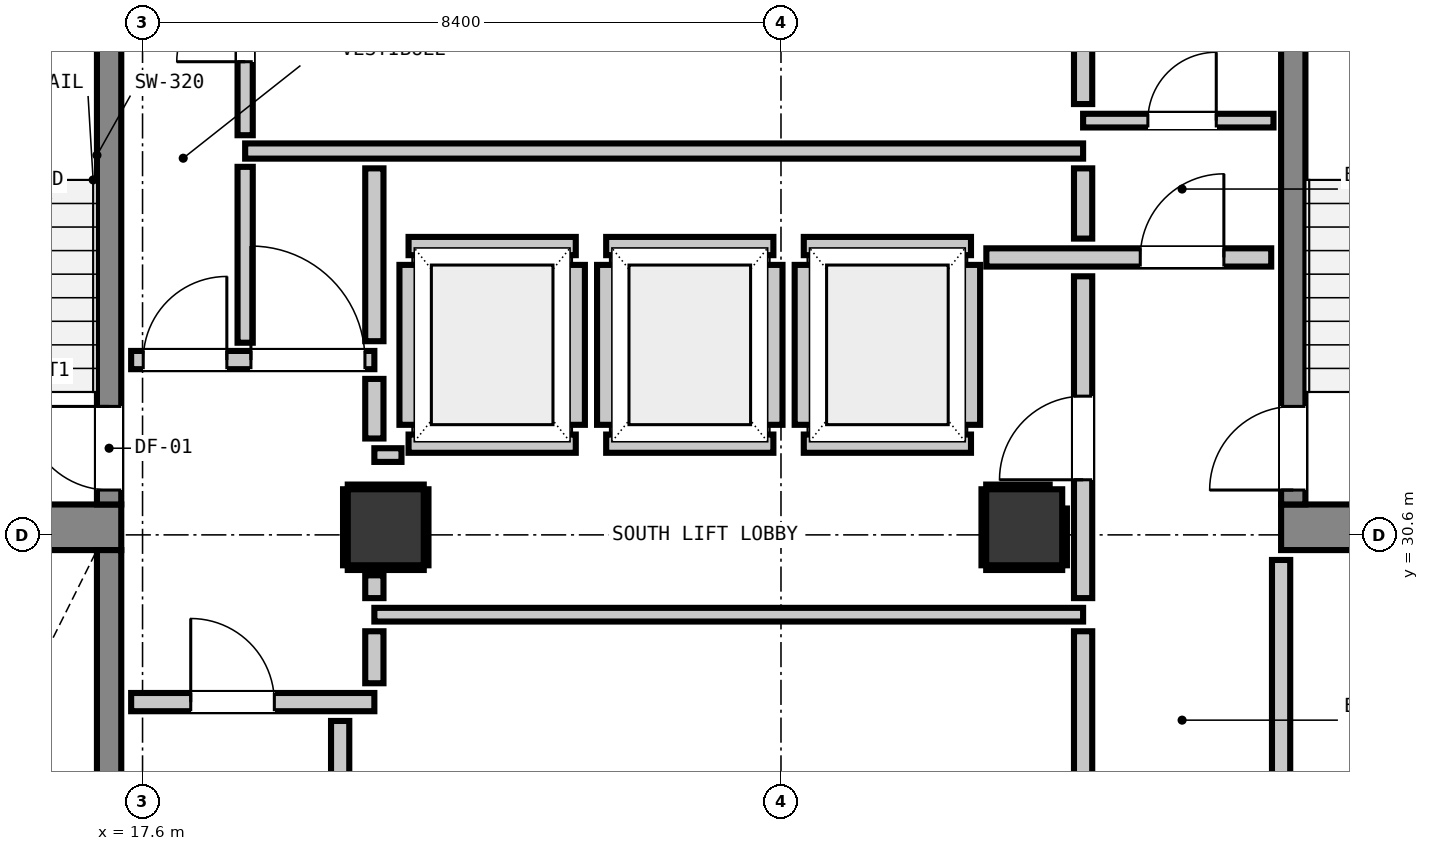
"""IFC4 building model, lengths in metres.
Left out: names, types, materials, properties, quantities, classifications, styles, units other than length and angle.
Written with IfcOpenShell. Run it as: python <this file> out.ifc"""

import sys

from ifc_helpers import new_model, si_unit, direction, frame, frame_2d, origin, origin_2d, place, context, subcontext, project, spatial, rectangle, extrude, element, fill, save


model = new_model("IFC4")
c1 = context("Model", 3, precision=1e-05, world=origin(), true_north=direction((0.0, 1.0)))
c2 = subcontext(c1, "Body", "Model", "MODEL_VIEW")
j1 = project(units=[si_unit("LENGTHUNIT", "METRE"), si_unit("PLANEANGLEUNIT", "RADIAN")], contexts=[c1])
p1 = place(None, origin())
s1 = spatial("IfcSite", under=j1, at=p1, CompositionType="ELEMENT")
p2 = place(p1, origin())
s2 = spatial("IfcBuilding", under=s1, at=p2, CompositionType="ELEMENT")
p3 = place(p2, frame((0.0, 0.0, 149.24)))
s3 = spatial("IfcBuildingStorey", under=s2, at=p3, CompositionType="ELEMENT", Elevation=149.24)
for number, where, z_axis, x_axis in (
    (1, (13.905, 30.7, 0.0), (0.0, 0.0, 1.0), (1.0, 0.0, 0.0)),
    (2, (32.58, 30.7, 0.0), (0.0, 0.0, 1.0), (1.0, 0.0, 0.0)),
):
    element("IfcWall", number, at=place(p3, frame(where, z_axis=z_axis, x_axis=x_axis)), inside=s3, PredefinedType="SHEAR", context=c2, shape_type="SweptSolid", body=[
        extrude(rectangle(XDim=3.415, YDim=0.6, at=frame_2d((1.708, 0.0))), origin(), (0.0, 0.0, 1.0), 3.32),
    ])
p4 = place(p3, frame((17.16, 31.0, 0.0), z_axis=(0.0, 0.0, 1.0), x_axis=(0.0, 1.0, 0.0)))
e3 = element("IfcWall", 3, at=p4, inside=s3, PredefinedType="SHEAR", context=c2, shape_type="SweptSolid", body=[
    extrude(rectangle(XDim=7.8, YDim=0.32, at=frame_2d((3.9, 0.0))), origin(), (0.0, 0.0, 1.0), 3.32),
])
p5 = place(p4, frame((0.19, 0.0, 0.0)))
e4 = element("IfcOpeningElement", 4, at=p5, cuts=e3, PredefinedType="OPENING", context=c2, shape_type="SweptSolid", body=[
    extrude(rectangle(XDim=1.1, YDim=2.15, at=frame_2d((0.55, 1.075))), frame((0.0, 0.17, 0.0), z_axis=(0.0, -1.0, 0.0), x_axis=(1.0, 0.0, 0.0)), (0.0, 0.0, 1.0), 0.34),
])
p6 = place(p3, frame((17.16, 22.5, 0.0), z_axis=(0.0, 0.0, 1.0), x_axis=(0.0, 1.0, 0.0)))
e5 = element("IfcWall", 5, at=p6, inside=s3, PredefinedType="SHEAR", context=c2, shape_type="SweptSolid", body=[
    extrude(rectangle(XDim=7.9, YDim=0.32, at=frame_2d((3.95, 0.0))), origin(), (0.0, 0.0, 1.0), 3.32),
])
p7 = place(p6, frame((0.29, 0.0, 0.0)))
e6 = element("IfcOpeningElement", 6, at=p7, cuts=e5, PredefinedType="OPENING", context=c2, shape_type="SweptSolid", body=[
    extrude(rectangle(XDim=1.1, YDim=2.15, at=frame_2d((0.55, 1.075))), frame((0.0, 0.17, 0.0), z_axis=(0.0, -1.0, 0.0), x_axis=(1.0, 0.0, 0.0)), (0.0, 0.0, 1.0), 0.34),
])
p8 = place(p3, frame((32.74, 31.0, 0.0), z_axis=(0.0, 0.0, 1.0), x_axis=(0.0, 1.0, 0.0)))
e7 = element("IfcWall", 7, at=p8, inside=s3, PredefinedType="SHEAR", context=c2, shape_type="SweptSolid", body=[
    extrude(rectangle(XDim=7.8, YDim=0.32, at=frame_2d((3.9, 0.0))), origin(), (0.0, 0.0, 1.0), 3.32),
])
p9 = place(p8, frame((0.19, 0.0, 0.0)))
e8 = element("IfcOpeningElement", 8, at=p9, cuts=e7, PredefinedType="OPENING", context=c2, shape_type="SweptSolid", body=[
    extrude(rectangle(XDim=1.1, YDim=2.15, at=frame_2d((0.55, 1.075))), frame((0.0, 0.17, 0.0), z_axis=(0.0, -1.0, 0.0), x_axis=(1.0, 0.0, 0.0)), (0.0, 0.0, 1.0), 0.34),
])
for number, where, z_axis, x_axis in (
    (9, (20.8, 30.7, 0.0), (0.0, 0.0, 1.0), (1.0, 0.0, 0.0)),
    (10, (29.2, 30.7, 0.0), (0.0, 0.0, 1.0), (1.0, 0.0, 0.0)),
):
    element("IfcColumn", number, at=place(p3, frame(where, z_axis=z_axis, x_axis=x_axis)), inside=s3, PredefinedType="COLUMN", context=c2, shape_type="SweptSolid", body=[
        extrude(rectangle(XDim=1.0, YDim=1.0, at=origin_2d()), origin(), (0.0, 0.0, 1.0), 3.32),
    ])
for number, where, z_axis, x_axis in (
    (11, (21.1, 31.8, 0.0), (0.0, 0.0, 1.0), (1.0, 0.0, 0.0)),
    (12, (21.1, 34.4, 0.0), (0.0, 0.0, 1.0), (1.0, 0.0, 0.0)),
):
    element("IfcWall", number, at=place(p3, frame(where, z_axis=z_axis, x_axis=x_axis)), inside=s3, PredefinedType="PARTITIONING", context=c2, shape_type="SweptSolid", body=[
        extrude(rectangle(XDim=2.2, YDim=0.24, at=frame_2d((1.1, 0.0))), origin(), (0.0, 0.0, 1.0), 3.08),
    ])
p10 = place(p3, frame((21.1, 32.048, 0.0), z_axis=(0.0, 0.0, 1.0), x_axis=(0.0, 1.0, 0.0)))
e13 = element("IfcWall", 13, at=p10, inside=s3, PredefinedType="PARTITIONING", context=c2, shape_type="SweptSolid", body=[
    extrude(rectangle(XDim=2.104, YDim=0.24, at=frame_2d((1.052, 0.0))), origin(), (0.0, 0.0, 1.0), 2.315),
])
p11 = place(p3, frame((23.3, 32.048, 0.0), z_axis=(0.0, 0.0, 1.0), x_axis=(0.0, 1.0, 0.0)))
e14 = element("IfcWall", 14, at=p11, inside=s3, PredefinedType="PARTITIONING", context=c2, shape_type="SweptSolid", body=[
    extrude(rectangle(XDim=2.104, YDim=0.24, at=frame_2d((1.052, 0.0))), origin(), (0.0, 0.0, 1.0), 3.08),
])
for number, where, z_axis, x_axis in (
    (15, (23.7, 31.8, 0.0), (0.0, 0.0, 1.0), (1.0, 0.0, 0.0)),
    (16, (23.7, 34.4, 0.0), (0.0, 0.0, 1.0), (1.0, 0.0, 0.0)),
):
    element("IfcWall", number, at=place(p3, frame(where, z_axis=z_axis, x_axis=x_axis)), inside=s3, PredefinedType="PARTITIONING", context=c2, shape_type="SweptSolid", body=[
        extrude(rectangle(XDim=2.2, YDim=0.24, at=frame_2d((1.1, 0.0))), origin(), (0.0, 0.0, 1.0), 3.08),
    ])
for number, where, z_axis, x_axis in (
    (17, (23.7, 32.048, 0.0), (0.0, 0.0, 1.0), (0.0, 1.0, 0.0)),
    (18, (25.9, 32.048, 0.0), (0.0, 0.0, 1.0), (0.0, 1.0, 0.0)),
):
    element("IfcWall", number, at=place(p3, frame(where, z_axis=z_axis, x_axis=x_axis)), inside=s3, PredefinedType="PARTITIONING", context=c2, shape_type="SweptSolid", body=[
        extrude(rectangle(XDim=2.104, YDim=0.24, at=frame_2d((1.052, 0.0))), origin(), (0.0, 0.0, 1.0), 3.08),
    ])
for number, where, z_axis, x_axis in (
    (19, (26.3, 31.8, 0.0), (0.0, 0.0, 1.0), (1.0, 0.0, 0.0)),
    (20, (26.3, 34.4, 0.0), (0.0, 0.0, 1.0), (1.0, 0.0, 0.0)),
):
    element("IfcWall", number, at=place(p3, frame(where, z_axis=z_axis, x_axis=x_axis)), inside=s3, PredefinedType="PARTITIONING", context=c2, shape_type="SweptSolid", body=[
        extrude(rectangle(XDim=2.2, YDim=0.24, at=frame_2d((1.1, 0.0))), origin(), (0.0, 0.0, 1.0), 3.08),
    ])
for number, where, z_axis, x_axis in (
    (21, (26.3, 32.048, 0.0), (0.0, 0.0, 1.0), (0.0, 1.0, 0.0)),
    (22, (28.5, 32.048, 0.0), (0.0, 0.0, 1.0), (0.0, 1.0, 0.0)),
):
    element("IfcWall", number, at=place(p3, frame(where, z_axis=z_axis, x_axis=x_axis)), inside=s3, PredefinedType="PARTITIONING", context=c2, shape_type="SweptSolid", body=[
        extrude(rectangle(XDim=2.104, YDim=0.24, at=frame_2d((1.052, 0.0))), origin(), (0.0, 0.0, 1.0), 3.08),
    ])
p12 = place(p3, frame((17.45, 28.4, 0.0), z_axis=(0.0, 0.0, 1.0), x_axis=(1.0, 0.0, 0.0)))
e23 = element("IfcWall", 23, at=p12, inside=s3, PredefinedType="PARTITIONING", context=c2, shape_type="SweptSolid", body=[
    extrude(rectangle(XDim=3.2, YDim=0.24, at=frame_2d((1.6, 0.0))), origin(), (0.0, 0.0, 1.0), 3.08),
])
p13 = place(p12, frame((0.784, 0.0, 0.0)))
e24 = element("IfcOpeningElement", 24, at=p13, cuts=e23, PredefinedType="OPENING", context=c2, shape_type="SweptSolid", body=[
    extrude(rectangle(XDim=1.1, YDim=2.15, at=frame_2d((0.55, 1.075))), frame((0.0, 0.13, 0.0), z_axis=(0.0, -1.0, 0.0), x_axis=(1.0, 0.0, 0.0)), (0.0, 0.0, 1.0), 0.26),
])
p14 = place(p3, frame((17.45, 32.9, 0.0), z_axis=(0.0, 0.0, 1.0), x_axis=(1.0, 0.0, 0.0)))
e25 = element("IfcWall", 25, at=p14, inside=s3, PredefinedType="PARTITIONING", context=c2, shape_type="SweptSolid", body=[
    extrude(rectangle(XDim=3.2, YDim=0.24, at=frame_2d((1.6, 0.0))), origin(), (0.0, 0.0, 1.0), 3.08),
])
p15 = place(p14, frame((0.159, 0.0, 0.0)))
e26 = element("IfcOpeningElement", 26, at=p15, cuts=e25, PredefinedType="OPENING", context=c2, shape_type="SweptSolid", body=[
    extrude(rectangle(XDim=1.1, YDim=2.15, at=frame_2d((0.55, 1.075))), frame((0.0, 0.13, 0.0), z_axis=(0.0, -1.0, 0.0), x_axis=(1.0, 0.0, 0.0)), (0.0, 0.0, 1.0), 0.26),
])
p16 = place(p14, frame((1.576, 0.0, 0.0)))
e27 = element("IfcOpeningElement", 27, at=p16, cuts=e25, PredefinedType="OPENING", context=c2, shape_type="SweptSolid", body=[
    extrude(rectangle(XDim=1.5, YDim=2.15, at=frame_2d((0.75, 1.075))), frame((0.0, 0.13, 0.0), z_axis=(0.0, -1.0, 0.0), x_axis=(1.0, 0.0, 0.0)), (0.0, 0.0, 1.0), 0.26),
])
p17 = place(p3, frame((28.702, 34.25, 0.0), z_axis=(0.0, 0.0, 1.0), x_axis=(1.0, 0.0, 0.0)))
e28 = element("IfcWall", 28, at=p17, inside=s3, PredefinedType="PARTITIONING", context=c2, shape_type="SweptSolid", body=[
    extrude(rectangle(XDim=3.748, YDim=0.24, at=frame_2d((1.874, 0.0))), origin(), (0.0, 0.0, 1.0), 3.08),
])
p18 = place(p17, frame((2.025, 0.0, 0.0)))
e29 = element("IfcOpeningElement", 29, at=p18, cuts=e28, PredefinedType="OPENING", context=c2, shape_type="SweptSolid", body=[
    extrude(rectangle(XDim=1.1, YDim=2.15, at=frame_2d((0.55, 1.075))), frame((0.0, 0.13, 0.0), z_axis=(0.0, -1.0, 0.0), x_axis=(1.0, 0.0, 0.0)), (0.0, 0.0, 1.0), 0.26),
])
p19 = place(p3, frame((18.95, 35.65, 0.0), z_axis=(0.0, 0.0, 1.0), x_axis=(1.0, 0.0, 0.0)))
e30 = element("IfcWall", 30, at=p19, inside=s3, PredefinedType="PARTITIONING", context=c2, shape_type="SweptSolid", body=[
    extrude(rectangle(XDim=11.025, YDim=0.2, at=frame_2d((5.513, 0.0))), origin(), (0.0, 0.0, 1.0), 3.08),
])
p20 = place(p3, frame((20.65, 29.55, 0.0), z_axis=(0.0, 0.0, 1.0), x_axis=(1.0, 0.0, 0.0)))
e31 = element("IfcWall", 31, at=p20, inside=s3, PredefinedType="PARTITIONING", context=c2, shape_type="SweptSolid", body=[
    extrude(rectangle(XDim=9.325, YDim=0.18, at=frame_2d((4.663, 0.0))), origin(), (0.0, 0.0, 1.0), 3.08),
])
p21 = place(p3, frame((20.65, 31.65, 0.0), z_axis=(0.0, 0.0, 1.0), x_axis=(1.0, 0.0, 0.0)))
e32 = element("IfcWall", 32, at=p21, inside=s3, PredefinedType="PARTITIONING", context=c2, shape_type="SweptSolid", body=[
    extrude(rectangle(XDim=0.357, YDim=0.18, at=frame_2d((0.179, 0.0))), origin(), (0.0, 0.0, 1.0), 3.08),
])
p22 = place(p3, frame((29.975, 36.05, 0.0), z_axis=(0.0, 0.0, 1.0), x_axis=(1.0, 0.0, 0.0)))
e33 = element("IfcWall", 33, at=p22, inside=s3, PredefinedType="PARTITIONING", context=c2, shape_type="SweptSolid", body=[
    extrude(rectangle(XDim=2.505, YDim=0.18, at=frame_2d((1.252, 0.0))), origin(), (0.0, 0.0, 1.0), 3.08),
])
p23 = place(p22, frame((0.852, 0.0, 0.0)))
e34 = element("IfcOpeningElement", 34, at=p23, cuts=e33, PredefinedType="OPENING", context=c2, shape_type="SweptSolid", body=[
    extrude(rectangle(XDim=0.9, YDim=2.1, at=frame_2d((0.45, 1.05))), frame((0.0, 0.1, 0.0), z_axis=(0.0, -1.0, 0.0), x_axis=(1.0, 0.0, 0.0)), (0.0, 0.0, 1.0), 0.2),
])
p24 = place(p3, frame((20.2, 22.586, 0.0), z_axis=(0.0, 0.0, 1.0), x_axis=(0.0, 1.0, 0.0)))
e35 = element("IfcWall", 35, at=p24, inside=s3, PredefinedType="PARTITIONING", context=c2, shape_type="SweptSolid", body=[
    extrude(rectangle(XDim=5.566, YDim=0.24, at=frame_2d((2.783, 0.0))), origin(), (0.0, 0.0, 1.0), 3.08),
])
p25 = place(p3, frame((20.65, 28.648, 0.0), z_axis=(0.0, 0.0, 1.0), x_axis=(0.0, 1.0, 0.0)))
e36 = element("IfcWall", 36, at=p25, inside=s3, PredefinedType="PARTITIONING", context=c2, shape_type="SweptSolid", body=[
    extrude(rectangle(XDim=0.684, YDim=0.24, at=frame_2d((0.342, 0.0))), origin(), (0.0, 0.0, 1.0), 2.315),
])
p26 = place(p3, frame((20.65, 29.768, 0.0), z_axis=(0.0, 0.0, 1.0), x_axis=(0.0, 1.0, 0.0)))
e37 = element("IfcWall", 37, at=p26, inside=s3, PredefinedType="PARTITIONING", context=c2, shape_type="SweptSolid", body=[
    extrude(rectangle(XDim=0.3, YDim=0.24, at=frame_2d((0.15, 0.0))), origin(), (0.0, 0.0, 1.0), 2.315),
])
p27 = place(p3, frame((20.65, 31.868, 0.0), z_axis=(0.0, 0.0, 1.0), x_axis=(0.0, 1.0, 0.0)))
e38 = element("IfcWall", 38, at=p27, inside=s3, PredefinedType="PARTITIONING", context=c2, shape_type="SweptSolid", body=[
    extrude(rectangle(XDim=0.784, YDim=0.24, at=frame_2d((0.392, 0.0))), origin(), (0.0, 0.0, 1.0), 2.315),
])
p28 = place(p3, frame((20.65, 33.148, 0.0), z_axis=(0.0, 0.0, 1.0), x_axis=(0.0, 1.0, 0.0)))
e39 = element("IfcWall", 39, at=p28, inside=s3, PredefinedType="PARTITIONING", context=c2, shape_type="SweptSolid", body=[
    extrude(rectangle(XDim=2.274, YDim=0.24, at=frame_2d((1.137, 0.0))), origin(), (0.0, 0.0, 1.0), 2.315),
])
p29 = place(p3, frame((29.975, 25.648, 0.0), z_axis=(0.0, 0.0, 1.0), x_axis=(0.0, 1.0, 0.0)))
e40 = element("IfcWall", 40, at=p29, inside=s3, PredefinedType="PARTITIONING", context=c2, shape_type="SweptSolid", body=[
    extrude(rectangle(XDim=3.684, YDim=0.24, at=frame_2d((1.842, 0.0))), origin(), (0.0, 0.0, 1.0), 3.08),
])
p30 = place(p3, frame((29.975, 29.768, 0.0), z_axis=(0.0, 0.0, 1.0), x_axis=(0.0, 1.0, 0.0)))
e41 = element("IfcWall", 41, at=p30, inside=s3, PredefinedType="PARTITIONING", context=c2, shape_type="SweptSolid", body=[
    extrude(rectangle(XDim=4.234, YDim=0.24, at=frame_2d((2.117, 0.0))), origin(), (0.0, 0.0, 1.0), 3.08),
])
p31 = place(p30, frame((1.557, 0.0, 0.0)))
e42 = element("IfcOpeningElement", 42, at=p31, cuts=e41, PredefinedType="OPENING", context=c2, shape_type="SweptSolid", body=[
    extrude(rectangle(XDim=1.1, YDim=2.15, at=frame_2d((0.55, 1.075))), frame((0.0, 0.13, 0.0), z_axis=(0.0, -1.0, 0.0), x_axis=(1.0, 0.0, 0.0)), (0.0, 0.0, 1.0), 0.26),
])
p32 = place(p3, frame((29.975, 34.498, 0.0), z_axis=(0.0, 0.0, 1.0), x_axis=(0.0, 1.0, 0.0)))
e43 = element("IfcWall", 43, at=p32, inside=s3, PredefinedType="PARTITIONING", context=c2, shape_type="SweptSolid", body=[
    extrude(rectangle(XDim=0.924, YDim=0.24, at=frame_2d((0.462, 0.0))), origin(), (0.0, 0.0, 1.0), 3.08),
])
p33 = place(p3, frame((29.975, 36.268, 0.0), z_axis=(0.0, 0.0, 1.0), x_axis=(0.0, 1.0, 0.0)))
e44 = element("IfcWall", 44, at=p33, inside=s3, PredefinedType="PARTITIONING", context=c2, shape_type="SweptSolid", body=[
    extrude(rectangle(XDim=2.294, YDim=0.24, at=frame_2d((1.147, 0.0))), origin(), (0.0, 0.0, 1.0), 3.08),
])
p34 = place(p3, frame((32.58, 25.648, 0.0), z_axis=(0.0, 0.0, 1.0), x_axis=(0.0, 1.0, 0.0)))
e45 = element("IfcWall", 45, at=p34, inside=s3, PredefinedType="PARTITIONING", context=c2, shape_type="SweptSolid", body=[
    extrude(rectangle(XDim=4.622, YDim=0.24, at=frame_2d((2.311, 0.0))), origin(), (0.0, 0.0, 1.0), 3.08),
])
p35 = place(p3, frame((18.95, 33.128, 0.0), z_axis=(0.0, 0.0, 1.0), x_axis=(0.0, 1.0, 0.0)))
e46 = element("IfcWall", 46, at=p35, inside=s3, PredefinedType="PARTITIONING", context=c2, shape_type="SweptSolid", body=[
    extrude(rectangle(XDim=2.314, YDim=0.2, at=frame_2d((1.157, 0.0))), origin(), (0.0, 0.0, 1.0), 3.08),
])
p36 = place(p3, frame((18.95, 35.858, 0.0), z_axis=(0.0, 0.0, 1.0), x_axis=(0.0, 1.0, 0.0)))
e47 = element("IfcWall", 47, at=p36, inside=s3, PredefinedType="PARTITIONING", context=c2, shape_type="SweptSolid", body=[
    extrude(rectangle(XDim=2.724, YDim=0.2, at=frame_2d((1.362, 0.0))), origin(), (0.0, 0.0, 1.0), 3.08),
])
p37 = place(p36, frame((0.967, 0.0, 0.0)))
e48 = element("IfcOpeningElement", 48, at=p37, cuts=e47, PredefinedType="OPENING", context=c2, shape_type="SweptSolid", body=[
    extrude(rectangle(XDim=0.9, YDim=2.1, at=frame_2d((0.45, 1.05))), frame((0.0, 0.11, 0.0), z_axis=(0.0, -1.0, 0.0), x_axis=(1.0, 0.0, 0.0)), (0.0, 0.0, 1.0), 0.22),
])
for number, where, z_axis, x_axis in (
    (49, (20.3, 30.168, 0.0), (0.0, 0.0, 1.0), (1.0, 0.0, 0.0)),
    (50, (20.3, 31.232, 0.0), (0.0, 0.0, 1.0), (1.0, 0.0, 0.0)),
    (51, (20.268, 30.2, 0.0), (0.0, 0.0, 1.0), (0.0, 1.0, 0.0)),
    (52, (21.332, 30.2, 0.0), (0.0, 0.0, 1.0), (0.0, 1.0, 0.0)),
    (53, (28.7, 30.168, 0.0), (0.0, 0.0, 1.0), (1.0, 0.0, 0.0)),
):
    element("IfcWall", number, at=place(p3, frame(where, z_axis=z_axis, x_axis=x_axis)), inside=s3, PredefinedType="PARTITIONING", context=c2, shape_type="SweptSolid", body=[
        extrude(rectangle(XDim=1.0, YDim=0.06, at=frame_2d((0.5, 0.0))), origin(), (0.0, 0.0, 1.0), 1.45),
    ])
p38 = place(p3, frame((28.7, 31.232, 0.0), z_axis=(0.0, 0.0, 1.0), x_axis=(1.0, 0.0, 0.0)))
e54 = element("IfcWall", 54, at=p38, inside=s3, PredefinedType="PARTITIONING", context=c2, shape_type="SweptSolid", body=[
    extrude(rectangle(XDim=0.835, YDim=0.06, at=frame_2d((0.417, 0.0))), origin(), (0.0, 0.0, 1.0), 1.45),
])
p39 = place(p3, frame((28.668, 30.2, 0.0), z_axis=(0.0, 0.0, 1.0), x_axis=(0.0, 1.0, 0.0)))
e55 = element("IfcWall", 55, at=p39, inside=s3, PredefinedType="PARTITIONING", context=c2, shape_type="SweptSolid", body=[
    extrude(rectangle(XDim=1.0, YDim=0.06, at=frame_2d((0.5, 0.0))), origin(), (0.0, 0.0, 1.0), 1.45),
])
p40 = place(p3, frame((29.732, 30.2, 0.0), z_axis=(0.0, 0.0, 1.0), x_axis=(0.0, 1.0, 0.0)))
e56 = element("IfcWall", 56, at=p40, inside=s3, PredefinedType="PARTITIONING", context=c2, shape_type="SweptSolid", body=[
    extrude(rectangle(XDim=0.747, YDim=0.06, at=frame_2d((0.374, 0.0))), origin(), (0.0, 0.0, 1.0), 1.45),
])
p41 = place(p5, origin())
e57 = element("IfcDoor", 57, at=p41, inside=s3, OperationType="SINGLE_SWING_RIGHT", PredefinedType="DOOR", context=c2, shape_type="SweptSolid", body=[
    extrude(rectangle(XDim=1.1, YDim=2.15, at=frame_2d((0.55, 1.075))), frame((0.0, 0.025, 0.0), z_axis=(0.0, -1.0, 0.0), x_axis=(1.0, 0.0, 0.0)), (0.0, 0.0, 1.0), 0.05),
])
fill(e4, e57)
p42 = place(p9, origin())
e58 = element("IfcDoor", 58, at=p42, inside=s3, OperationType="SINGLE_SWING_LEFT", PredefinedType="DOOR", context=c2, shape_type="SweptSolid", body=[
    extrude(rectangle(XDim=1.1, YDim=2.15, at=frame_2d((0.55, 1.075))), frame((0.0, 0.025, 0.0), z_axis=(0.0, -1.0, 0.0), x_axis=(1.0, 0.0, 0.0)), (0.0, 0.0, 1.0), 0.05),
])
fill(e8, e58)
p43 = place(p13, origin())
e59 = element("IfcDoor", 59, at=p43, inside=s3, OperationType="SINGLE_SWING_LEFT", PredefinedType="DOOR", context=c2, shape_type="SweptSolid", body=[
    extrude(rectangle(XDim=1.1, YDim=2.15, at=frame_2d((0.55, 1.075))), frame((0.0, 0.025, 0.0), z_axis=(0.0, -1.0, 0.0), x_axis=(1.0, 0.0, 0.0)), (0.0, 0.0, 1.0), 0.05),
])
fill(e24, e59)
p44 = place(p15, origin())
e60 = element("IfcDoor", 60, at=p44, inside=s3, OperationType="SINGLE_SWING_RIGHT", PredefinedType="DOOR", context=c2, shape_type="SweptSolid", body=[
    extrude(rectangle(XDim=1.1, YDim=2.15, at=frame_2d((0.55, 1.075))), frame((0.0, 0.025, 0.0), z_axis=(0.0, -1.0, 0.0), x_axis=(1.0, 0.0, 0.0)), (0.0, 0.0, 1.0), 0.05),
])
fill(e26, e60)
p45 = place(p31, origin())
e61 = element("IfcDoor", 61, at=p45, inside=s3, OperationType="SINGLE_SWING_LEFT", PredefinedType="DOOR", context=c2, shape_type="SweptSolid", body=[
    extrude(rectangle(XDim=1.1, YDim=2.15, at=frame_2d((0.55, 1.075))), frame((0.0, 0.025, 0.0), z_axis=(0.0, -1.0, 0.0), x_axis=(1.0, 0.0, 0.0)), (0.0, 0.0, 1.0), 0.05),
])
fill(e42, e61)
p46 = place(p18, origin())
e62 = element("IfcDoor", 62, at=p46, inside=s3, OperationType="SINGLE_SWING_RIGHT", PredefinedType="DOOR", context=c2, shape_type="SweptSolid", body=[
    extrude(rectangle(XDim=1.1, YDim=2.15, at=frame_2d((0.55, 1.075))), frame((0.0, 0.025, 0.0), z_axis=(0.0, -1.0, 0.0), x_axis=(1.0, 0.0, 0.0)), (0.0, 0.0, 1.0), 0.05),
])
fill(e29, e62)
p47 = place(p16, origin())
e63 = element("IfcDoor", 63, at=p47, inside=s3, OperationType="SINGLE_SWING_LEFT", PredefinedType="DOOR", context=c2, shape_type="SweptSolid", body=[
    extrude(rectangle(XDim=1.5, YDim=2.15, at=frame_2d((0.75, 1.075))), frame((0.0, 0.025, 0.0), z_axis=(0.0, -1.0, 0.0), x_axis=(1.0, 0.0, 0.0)), (0.0, 0.0, 1.0), 0.05),
])
fill(e27, e63)
p48 = place(p23, origin())
e64 = element("IfcDoor", 64, at=p48, inside=s3, OperationType="SINGLE_SWING_RIGHT", PredefinedType="DOOR", context=c2, shape_type="SweptSolid", body=[
    extrude(rectangle(XDim=0.9, YDim=2.1, at=frame_2d((0.45, 1.05))), frame((0.0, 0.025, 0.0), z_axis=(0.0, -1.0, 0.0), x_axis=(1.0, 0.0, 0.0)), (0.0, 0.0, 1.0), 0.05),
])
fill(e34, e64)
p49 = place(p37, origin())
e65 = element("IfcDoor", 65, at=p49, inside=s3, OperationType="SINGLE_SWING_LEFT", PredefinedType="DOOR", context=c2, shape_type="SweptSolid", body=[
    extrude(rectangle(XDim=0.9, YDim=2.1, at=frame_2d((0.45, 1.05))), frame((0.0, 0.025, 0.0), z_axis=(0.0, -1.0, 0.0), x_axis=(1.0, 0.0, 0.0)), (0.0, 0.0, 1.0), 0.05),
])
fill(e48, e65)
save(model, sys.argv[1])
